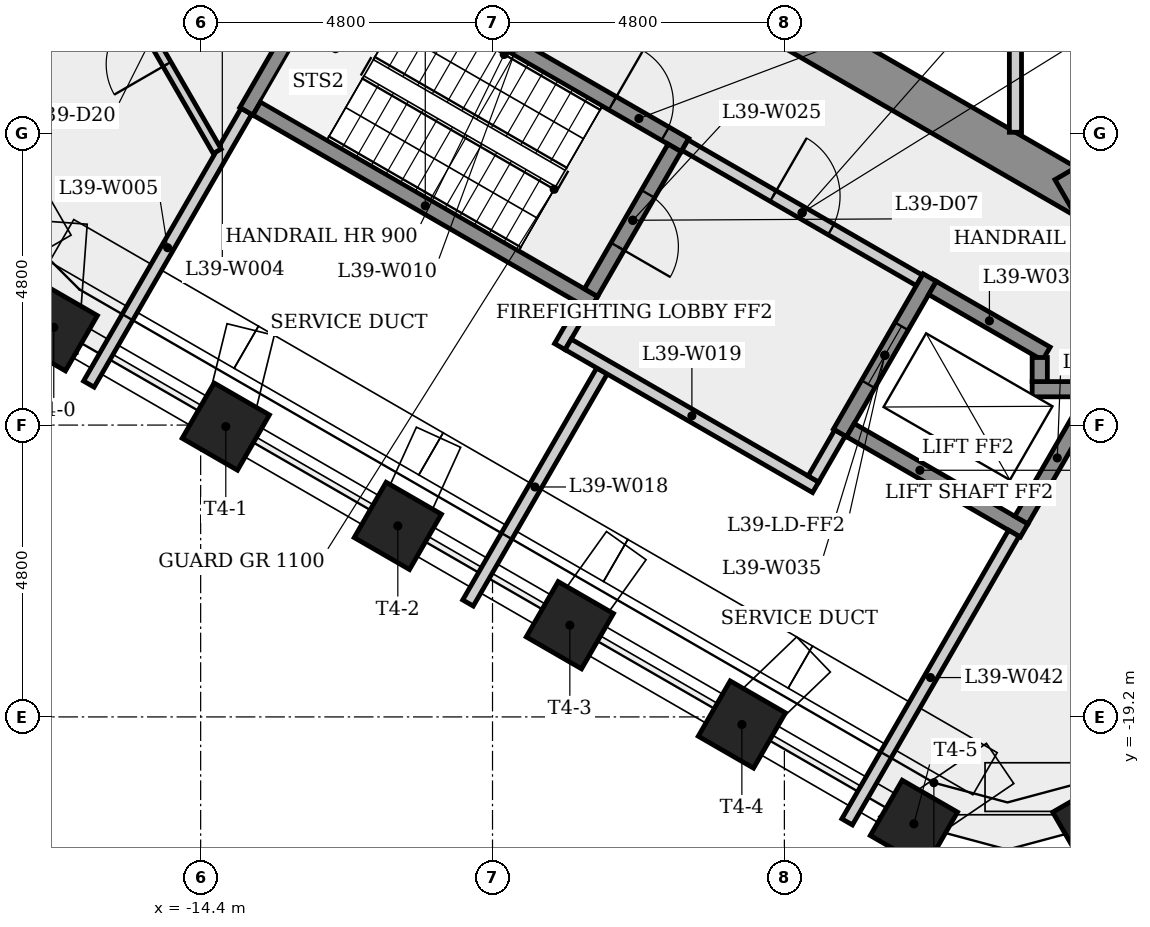
"""IFC4 building model, lengths in metres.
Left out: names, types, materials, properties, quantities, classifications, styles, units other than length and angle.
Written with IfcOpenShell. Run it as: python <this file> out.ifc"""

import sys

from ifc_helpers import new_model, si_unit, direction, frame, frame_2d, origin, origin_2d, place, context, subcontext, project, spatial, rectangle, extrude, element, fill, save


model = new_model("IFC4")
c1 = context("Model", 3, precision=1e-05, world=origin(), true_north=direction((0.0, 1.0)))
c2 = subcontext(c1, "Body", "Model", "MODEL_VIEW")
j1 = project(units=[si_unit("LENGTHUNIT", "METRE"), si_unit("PLANEANGLEUNIT", "RADIAN")], contexts=[c1])
p1 = place(None, origin())
s1 = spatial("IfcSite", under=j1, at=p1, CompositionType="ELEMENT")
p2 = place(p1, origin())
s2 = spatial("IfcBuilding", under=s1, at=p2, CompositionType="ELEMENT")
p3 = place(p2, frame((0.0, 0.0, 147.9)))
s3 = spatial("IfcBuildingStorey", under=s2, at=p3, CompositionType="ELEMENT", Elevation=147.9)
p4 = place(p3, frame((-9.325, -5.182, 0.0), z_axis=(0.0, 0.0, 1.0), x_axis=(0.866023993627, -0.500002442456, 0.0)))
e1 = element("IfcWall", 1, at=p4, inside=s3, PredefinedType="SHEAR", context=c2, shape_type="SweptSolid", body=[
    extrude(rectangle(XDim=10.97, YDim=0.7, at=frame_2d((5.485, 0.0))), origin(), (0.0, 0.0, 1.0), 4.8),
])
p5 = place(p4, frame((2.817, 0.0, 0.0)))
e2 = element("IfcOpeningElement", 2, at=p5, cuts=e1, PredefinedType="OPENING", context=c2, shape_type="SweptSolid", body=[
    extrude(rectangle(XDim=0.9, YDim=2.1, at=frame_2d((0.45, 1.05))), frame((0.0, 0.36, 0.0), z_axis=(0.0, -1.0, 0.0), x_axis=(1.0, 0.0, 0.0)), (0.0, 0.0, 1.0), 0.72),
])
p6 = place(p3, frame((-0.175, -10.667, 0.0), z_axis=(0.0, 0.0, 1.0), x_axis=(0.866023993627, 0.500002442456, 0.0)))
e3 = element("IfcWall", 3, at=p6, inside=s3, PredefinedType="SHEAR", context=c2, shape_type="SweptSolid", body=[
    extrude(rectangle(XDim=10.97, YDim=0.7, at=frame_2d((5.485, 0.0))), origin(), (0.0, 0.0, 1.0), 4.8),
])
p7 = place(p6, frame((1.34, 0.0, 0.0)))
e4 = element("IfcOpeningElement", 4, at=p7, cuts=e3, PredefinedType="OPENING", context=c2, shape_type="SweptSolid", body=[
    extrude(rectangle(XDim=0.9, YDim=2.1, at=frame_2d((0.45, 1.05))), frame((0.0, 0.36, 0.0), z_axis=(0.0, -1.0, 0.0), x_axis=(1.0, 0.0, 0.0)), (0.0, 0.0, 1.0), 0.72),
])
p8 = place(p6, frame((8.061, 0.0, 0.0)))
e5 = element("IfcOpeningElement", 5, at=p8, cuts=e3, PredefinedType="OPENING", context=c2, shape_type="SweptSolid", body=[
    extrude(rectangle(XDim=0.9, YDim=2.1, at=frame_2d((0.45, 1.05))), frame((0.0, 0.36, 0.0), z_axis=(0.0, -1.0, 0.0), x_axis=(1.0, 0.0, 0.0)), (0.0, 0.0, 1.0), 0.72),
])
for number, where, z_axis, x_axis in (
    (6, (-16.816, -12.792, 0.0), (0.0, 0.0, 1.0), (-0.5, -0.866, 0.0)),
    (7, (-13.987, -14.425, 0.0), (0.0, 0.0, 1.0), (-0.5, -0.866, 0.0)),
    (8, (-11.157, -16.058, 0.0), (0.0, 0.0, 1.0), (-0.5, -0.866, 0.0)),
    (9, (-8.328, -17.692, 0.0), (0.0, 0.0, 1.0), (-0.5, -0.866, 0.0)),
    (10, (-5.499, -19.325, 0.0), (0.0, 0.0, 1.0), (-0.5, -0.866, 0.0)),
    (11, (-2.67, -20.958, 0.0), (0.0, 0.0, 1.0), (-0.5, -0.866, 0.0)),
    (12, (0.33, -20.958, 0.0), (0.0, 0.0, 1.0), (0.5, -0.866, 0.0)),
):
    element("IfcColumn", number, at=place(p3, frame(where, z_axis=z_axis, x_axis=x_axis)), inside=s3, PredefinedType="COLUMN", context=c2, shape_type="SweptSolid", body=[
        extrude(rectangle(XDim=1.05, YDim=1.05, at=origin_2d()), origin(), (0.0, 0.0, 1.0), 4.45),
    ])
p9 = place(p3, frame((-16.239, -13.726, 0.0), z_axis=(0.0, 0.0, 1.0), x_axis=(0.499990271856, 0.866031020258, 0.0)))
e13 = element("IfcWall", 13, at=p9, inside=s3, PredefinedType="PLUMBINGWALL", context=c2, shape_type="SweptSolid", body=[
    extrude(rectangle(XDim=5.182, YDim=0.2, at=frame_2d((2.591, 0.0))), origin(), (0.0, 0.0, 1.0), 4.45),
])
p10 = place(p3, frame((-14.127, -9.896, 0.0), z_axis=(0.0, 0.0, 1.0), x_axis=(-0.500005500391, 0.866022228109, 0.0)))
e14 = element("IfcWall", 14, at=p10, inside=s3, PredefinedType="PARTITIONING", context=c2, shape_type="SweptSolid", body=[
    extrude(rectangle(XDim=4.306, YDim=0.15, at=frame_2d((2.153, 0.0))), origin(), (0.0, 0.0, 1.0), 4.45),
])
p11 = place(p10, frame((1.653, 0.0, 0.0)))
e15 = element("IfcOpeningElement", 15, at=p11, cuts=e14, PredefinedType="OPENING", context=c2, shape_type="SweptSolid", body=[
    extrude(rectangle(XDim=1.0, YDim=2.1, at=frame_2d((0.5, 1.05))), frame((0.0, 0.085, 0.0), z_axis=(0.0, -1.0, 0.0), x_axis=(1.0, 0.0, 0.0)), (0.0, 0.0, 1.0), 0.17),
])
p12 = place(p3, frame((-13.648, -9.239, 0.0), z_axis=(0.0, 0.0, 1.0), x_axis=(0.500017246033, 0.866015446554, 0.0)))
e16 = element("IfcWall", 16, at=p12, inside=s3, PredefinedType="SHEAR", context=c2, shape_type="SweptSolid", body=[
    extrude(rectangle(XDim=3.25, YDim=0.25, at=frame_2d((1.625, 0.0))), origin(), (0.0, 0.0, 1.0), 4.45),
])
p13 = place(p3, frame((-11.977, -6.595, 0.0), z_axis=(0.0, 0.0, 1.0), x_axis=(0.866025499775, -0.499999833739, 0.0)))
e17 = element("IfcWall", 17, at=p13, inside=s3, PredefinedType="SHEAR", context=c2, shape_type="SweptSolid", body=[
    extrude(rectangle(XDim=6.4, YDim=0.25, at=frame_2d((3.2, 0.0))), origin(), (0.0, 0.0, 1.0), 4.45),
])
p14 = place(p13, frame((5.025, 0.0, 0.0)))
e18 = element("IfcOpeningElement", 18, at=p14, cuts=e17, PredefinedType="OPENING", context=c2, shape_type="SweptSolid", body=[
    extrude(rectangle(XDim=1.0, YDim=2.1, at=frame_2d((0.5, 1.05))), frame((0.0, 0.135, 0.0), z_axis=(0.0, -1.0, 0.0), x_axis=(1.0, 0.0, 0.0)), (0.0, 0.0, 1.0), 0.27),
])
p15 = place(p3, frame((-8.493, -13.11, 0.0), z_axis=(0.0, 0.0, 1.0), x_axis=(0.500067724834, 0.865986299303, 0.0)))
e19 = element("IfcWall", 19, at=p15, inside=s3, PredefinedType="PLUMBINGWALL", context=c2, shape_type="SweptSolid", body=[
    extrude(rectangle(XDim=0.775, YDim=0.2, at=frame_2d((0.388, 0.0))), origin(), (0.0, 0.0, 1.0), 4.45),
])
p16 = place(p3, frame((-7.935, -12.393, 0.0), z_axis=(0.0, 0.0, 1.0), x_axis=(-0.866025499775, 0.499999833739, 0.0)))
e20 = element("IfcWall", 20, at=p16, inside=s3, PredefinedType="SHEAR", context=c2, shape_type="SweptSolid", body=[
    extrude(rectangle(XDim=6.4, YDim=0.25, at=frame_2d((3.2, 0.0))), origin(), (0.0, 0.0, 1.0), 4.45),
])
p17 = place(p3, frame((-7.8, -13.51, 0.0), z_axis=(0.0, 0.0, 1.0), x_axis=(-0.5000181976, -0.86601489714, 0.0)))
e21 = element("IfcWall", 21, at=p17, inside=s3, PredefinedType="PLUMBINGWALL", context=c2, shape_type="SweptSolid", body=[
    extrude(rectangle(XDim=4.406, YDim=0.2, at=frame_2d((2.203, 0.0))), origin(), (0.0, 0.0, 1.0), 4.45),
])
p18 = place(p3, frame((-8.356, -13.073, 0.0), z_axis=(0.0, 0.0, 1.0), x_axis=(0.866038532462, -0.499977259774, 0.0)))
e22 = element("IfcWall", 22, at=p18, inside=s3, PredefinedType="PLUMBINGWALL", context=c2, shape_type="SweptSolid", body=[
    extrude(rectangle(XDim=4.7, YDim=0.2, at=frame_2d((2.35, 0.0))), origin(), (0.0, 0.0, 1.0), 4.45),
])
p19 = place(p3, frame((-6.605, -9.841, 0.0), z_axis=(0.0, 0.0, 1.0), x_axis=(-0.499996545922, -0.866027397988, 0.0)))
e23 = element("IfcWall", 23, at=p19, inside=s3, PredefinedType="SHEAR", context=c2, shape_type="SweptSolid", body=[
    extrude(rectangle(XDim=2.75, YDim=0.25, at=frame_2d((1.375, 0.0))), origin(), (0.0, 0.0, 1.0), 4.45),
])
p20 = place(p19, frame((0.875, 0.0, 0.0)))
e24 = element("IfcOpeningElement", 24, at=p20, cuts=e23, PredefinedType="OPENING", context=c2, shape_type="SweptSolid", body=[
    extrude(rectangle(XDim=1.0, YDim=2.1, at=frame_2d((0.5, 1.05))), frame((0.0, 0.135, 0.0), z_axis=(0.0, -1.0, 0.0), x_axis=(1.0, 0.0, 0.0)), (0.0, 0.0, 1.0), 0.27),
])
p21 = place(p3, frame((-6.435, -9.795, 0.0), z_axis=(0.0, 0.0, 1.0), x_axis=(0.866012907634, -0.500021643343, 0.0)))
e25 = element("IfcWall", 25, at=p21, inside=s3, PredefinedType="PARTITIONING", context=c2, shape_type="SweptSolid", body=[
    extrude(rectangle(XDim=4.45, YDim=0.2, at=frame_2d((2.225, 0.0))), origin(), (0.0, 0.0, 1.0), 4.45),
])
p22 = place(p21, frame((1.675, 0.0, 0.0)))
e26 = element("IfcOpeningElement", 26, at=p22, cuts=e25, PredefinedType="OPENING", context=c2, shape_type="SweptSolid", body=[
    extrude(rectangle(XDim=1.1, YDim=2.1, at=frame_2d((0.55, 1.05))), frame((0.0, 0.11, 0.0), z_axis=(0.0, -1.0, 0.0), x_axis=(1.0, 0.0, 0.0)), (0.0, 0.0, 1.0), 0.22),
])
p23 = place(p3, frame((-3.885, -14.529, 0.0), z_axis=(0.0, 0.0, 1.0), x_axis=(-0.499859285417, -0.866106630146, 0.0)))
e27 = element("IfcWall", 27, at=p23, inside=s3, PredefinedType="PLUMBINGWALL", context=c2, shape_type="SweptSolid", body=[
    extrude(rectangle(XDim=0.875, YDim=0.2, at=frame_2d((0.438, 0.0))), origin(), (0.0, 0.0, 1.0), 4.45),
])
p24 = place(p3, frame((-2.41, -11.974, 0.0), z_axis=(0.0, 0.0, 1.0), x_axis=(-0.500001826776, -0.866024349092, 0.0)))
e28 = element("IfcWall", 28, at=p24, inside=s3, PredefinedType="SHEAR", context=c2, shape_type="SweptSolid", body=[
    extrude(rectangle(XDim=2.95, YDim=0.25, at=frame_2d((1.475, 0.0))), origin(), (0.0, 0.0, 1.0), 4.45),
])
p25 = place(p24, frame((0.925, 0.0, 0.0)))
e29 = element("IfcOpeningElement", 29, at=p25, cuts=e28, PredefinedType="OPENING", context=c2, shape_type="SweptSolid", body=[
    extrude(rectangle(XDim=1.1, YDim=2.1, at=frame_2d((0.55, 1.05))), frame((0.0, 0.135, 0.0), z_axis=(0.0, -1.0, 0.0), x_axis=(1.0, 0.0, 0.0)), (0.0, 0.0, 1.0), 0.27),
])
p26 = place(p3, frame((-2.364, -12.145, 0.0), z_axis=(0.0, 0.0, 1.0), x_axis=(0.86603892542, -0.499976579108, 0.0)))
e30 = element("IfcWall", 30, at=p26, inside=s3, PredefinedType="SHEAR", context=c2, shape_type="SweptSolid", body=[
    extrude(rectangle(XDim=2.162, YDim=0.25, at=frame_2d((1.081, 0.0))), origin(), (0.0, 0.0, 1.0), 4.8),
])
p27 = place(p3, frame((-1.0, -5.275, 0.0), z_axis=(0.0, 0.0, 1.0), x_axis=(0.0, -1.0, 0.0)))
e31 = element("IfcWall", 31, at=p27, inside=s3, PredefinedType="PARTITIONING", context=c2, shape_type="SweptSolid", body=[
    extrude(rectangle(XDim=4.309, YDim=0.2, at=frame_2d((2.155, 0.0))), origin(), (0.0, 0.0, 1.0), 4.45),
])
p28 = place(p3, frame((-0.856, -16.133, 0.0), z_axis=(0.0, 0.0, 1.0), x_axis=(-0.866021716278, 0.500006386895, 0.0)))
e32 = element("IfcWall", 32, at=p28, inside=s3, PredefinedType="SHEAR", context=c2, shape_type="SweptSolid", body=[
    extrude(rectangle(XDim=3.3, YDim=0.25, at=frame_2d((1.65, 0.0))), origin(), (0.0, 0.0, 1.0), 4.45),
])
p29 = place(p3, frame((-1.027, -16.179, 0.0), z_axis=(0.0, 0.0, 1.0), x_axis=(-0.499980760091, -0.866036511666, 0.0)))
e33 = element("IfcWall", 33, at=p29, inside=s3, PredefinedType="PLUMBINGWALL", context=c2, shape_type="SweptSolid", body=[
    extrude(rectangle(XDim=5.482, YDim=0.2, at=frame_2d((2.741, 0.0))), origin(), (0.0, 0.0, 1.0), 4.45),
])
p30 = place(p3, frame((-0.725, -13.81, 0.0), z_axis=(0.0, 0.0, 1.0), x_axis=(1.0, 0.0, 0.0)))
e34 = element("IfcWall", 34, at=p30, inside=s3, PredefinedType="SHEAR", context=c2, shape_type="SweptSolid", body=[
    extrude(rectangle(XDim=1.191, YDim=0.25, at=frame_2d((0.595, 0.0))), origin(), (0.0, 0.0, 1.0), 4.45),
])
p31 = place(p3, frame((-0.6, -13.289, 0.0), z_axis=(0.0, 0.0, 1.0), x_axis=(0.0, -1.0, 0.0)))
e35 = element("IfcWall", 35, at=p31, inside=s3, PredefinedType="SHEAR", context=c2, shape_type="SweptSolid", body=[
    extrude(rectangle(XDim=0.396, YDim=0.25, at=frame_2d((0.198, 0.0))), origin(), (0.0, 0.0, 1.0), 4.8),
])
p32 = place(p3, frame((0.278, -13.918, 0.0), z_axis=(0.0, 0.0, 1.0), x_axis=(-0.49998806882, -0.866032292145, 0.0)))
e36 = element("IfcWall", 36, at=p32, inside=s3, PredefinedType="SHEAR", context=c2, shape_type="SweptSolid", body=[
    extrude(rectangle(XDim=2.36, YDim=0.25, at=frame_2d((1.18, 0.0))), origin(), (0.0, 0.0, 1.0), 4.8),
])
p33 = place(p14, origin())
e37 = element("IfcDoor", 37, at=p33, inside=s3, OperationType="SINGLE_SWING_LEFT", PredefinedType="DOOR", context=c2, shape_type="SweptSolid", body=[
    extrude(rectangle(XDim=1.0, YDim=2.1, at=frame_2d((0.5, 1.05))), frame((0.0, 0.025, 0.0), z_axis=(0.0, -1.0, 0.0), x_axis=(1.0, 0.0, 0.0)), (0.0, 0.0, 1.0), 0.05),
])
fill(e18, e37)
p34 = place(p20, origin())
e38 = element("IfcDoor", 38, at=p34, inside=s3, OperationType="SINGLE_SWING_RIGHT", PredefinedType="DOOR", context=c2, shape_type="SweptSolid", body=[
    extrude(rectangle(XDim=1.0, YDim=2.1, at=frame_2d((0.5, 1.05))), frame((0.0, 0.025, 0.0), z_axis=(0.0, -1.0, 0.0), x_axis=(1.0, 0.0, 0.0)), (0.0, 0.0, 1.0), 0.05),
])
fill(e24, e38)
p35 = place(p22, origin())
e39 = element("IfcDoor", 39, at=p35, inside=s3, OperationType="SINGLE_SWING_LEFT", PredefinedType="DOOR", context=c2, shape_type="SweptSolid", body=[
    extrude(rectangle(XDim=1.1, YDim=2.1, at=frame_2d((0.55, 1.05))), frame((0.0, 0.025, 0.0), z_axis=(0.0, -1.0, 0.0), x_axis=(1.0, 0.0, 0.0)), (0.0, 0.0, 1.0), 0.05),
])
fill(e26, e39)
p36 = place(p25, origin())
e40 = element("IfcDoor", 40, at=p36, inside=s3, OperationType="SLIDING_TO_LEFT", PredefinedType="DOOR", context=c2, shape_type="SweptSolid", body=[
    extrude(rectangle(XDim=1.1, YDim=2.1, at=frame_2d((0.55, 1.05))), frame((0.0, 0.025, 0.0), z_axis=(0.0, -1.0, 0.0), x_axis=(1.0, 0.0, 0.0)), (0.0, 0.0, 1.0), 0.05),
])
fill(e29, e40)
p37 = place(p11, origin())
e41 = element("IfcDoor", 41, at=p37, inside=s3, OperationType="SINGLE_SWING_LEFT", PredefinedType="DOOR", context=c2, shape_type="SweptSolid", body=[
    extrude(rectangle(XDim=1.0, YDim=2.1, at=frame_2d((0.5, 1.05))), frame((0.0, 0.025, 0.0), z_axis=(0.0, -1.0, 0.0), x_axis=(1.0, 0.0, 0.0)), (0.0, 0.0, 1.0), 0.05),
])
fill(e15, e41)
save(model, sys.argv[1])
